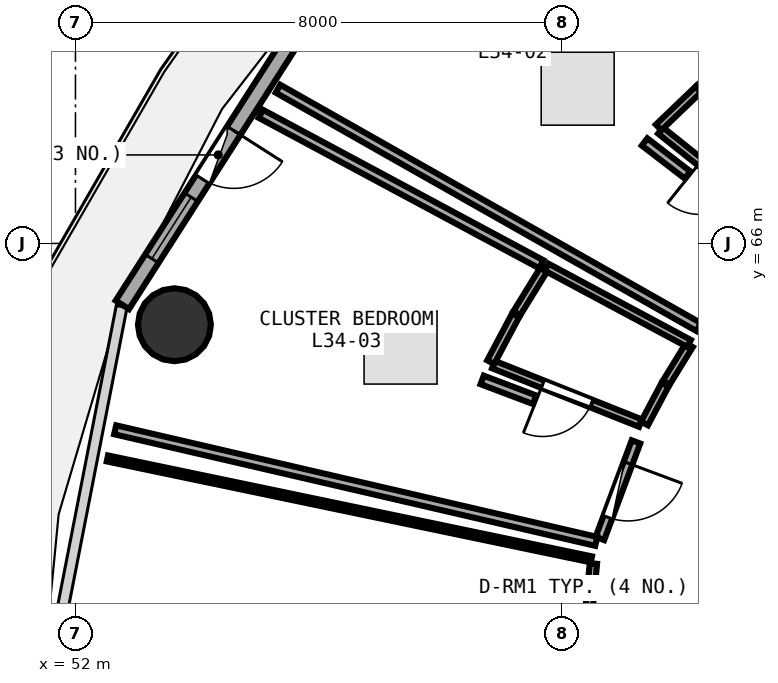
"""IFC4 building model, lengths in metres.
Left out: names, types, materials, properties, quantities, classifications, styles, units other than length and angle.
Written with IfcOpenShell. Run it as: python <this file> out.ifc"""

import sys

from ifc_helpers import new_model, si_unit, direction, frame, frame_2d, origin, origin_2d, place, context, subcontext, project, spatial, rectangle, circle, extrude, element, fill, save


model = new_model("IFC4")
c1 = context("Model", 3, precision=1e-05, world=origin(), true_north=direction((0.0, 1.0)))
c2 = subcontext(c1, "Body", "Model", "MODEL_VIEW")
j1 = project(units=[si_unit("LENGTHUNIT", "METRE"), si_unit("PLANEANGLEUNIT", "RADIAN")], contexts=[c1])
p1 = place(None, origin())
s1 = spatial("IfcSite", under=j1, at=p1, CompositionType="ELEMENT")
p2 = place(p1, origin())
s2 = spatial("IfcBuilding", under=s1, at=p2, CompositionType="ELEMENT")
p3 = place(p2, frame((0.0, 0.0, 135.6)))
s3 = spatial("IfcBuildingStorey", under=s2, at=p3, CompositionType="ELEMENT", Elevation=135.6)
p4 = place(p3, frame((53.627, 64.663, 0.0), z_axis=(0.0, 0.0, 1.0), x_axis=(1.0, 0.0, 0.0)))
e1 = element("IfcColumn", 1, at=p4, inside=s3, PredefinedType="COLUMN", context=c2, shape_type="SweptSolid", body=[
    extrude(circle(Radius=0.6, at=origin_2d()), origin(), (0.0, 0.0, 1.0), 3.75),
])
p5 = place(p3, frame((56.679, 71.1, 0.0), z_axis=(0.0, 0.0, 1.0), x_axis=(-0.538801521808, -0.842432739213, 0.0)))
e2 = element("IfcWall", 2, at=p5, inside=s3, PredefinedType="SOLIDWALL", context=c2, shape_type="SweptSolid", body=[
    extrude(rectangle(XDim=7.253, YDim=0.26, at=frame_2d((3.627, 0.0))), origin(), (0.0, 0.0, 1.0), 3.475),
])
p6 = place(p5, frame((3.852, 0.0, 0.0)))
e3 = element("IfcOpeningElement", 3, at=p6, cuts=e2, PredefinedType="OPENING", context=c2, shape_type="SweptSolid", body=[
    extrude(rectangle(XDim=0.95, YDim=2.1, at=frame_2d((0.475, 1.05))), frame((0.0, 0.14, 0.0), z_axis=(0.0, -1.0, 0.0), x_axis=(1.0, 0.0, 0.0)), (0.0, 0.0, 1.0), 0.28),
])
p7 = place(p5, frame((5.152, 0.0, 0.85)))
e4 = element("IfcOpeningElement", 4, at=p7, cuts=e2, PredefinedType="OPENING", context=c2, shape_type="SweptSolid", body=[
    extrude(rectangle(XDim=1.2, YDim=1.45, at=frame_2d((0.6, 0.725))), frame((0.0, 0.14, 0.0), z_axis=(0.0, -1.0, 0.0), x_axis=(1.0, 0.0, 0.0)), (0.0, 0.0, 1.0), 0.28),
])
p8 = place(p3, frame((63.599, 66.278, 0.0), z_axis=(0.0, 0.0, 1.0), x_axis=(-0.781386491078, 0.624047395284, 0.0)))
e5 = element("IfcWall", 5, at=p8, inside=s3, PredefinedType="PLUMBINGWALL", context=c2, shape_type="SweptSolid", body=[
    extrude(rectangle(XDim=2.529, YDim=0.13, at=frame_2d((1.265, 0.0))), origin(), (0.0, 0.0, 1.0), 2.975),
])
p9 = place(p8, frame((0.835, 0.0, 0.0)))
e6 = element("IfcOpeningElement", 6, at=p9, cuts=e5, PredefinedType="OPENING", context=c2, shape_type="SweptSolid", body=[
    extrude(rectangle(XDim=0.86, YDim=2.05, at=frame_2d((0.43, 1.025))), frame((0.0, 0.075, 0.0), z_axis=(0.0, -1.0, 0.0), x_axis=(1.0, 0.0, 0.0)), (0.0, 0.0, 1.0), 0.15),
])
p10 = place(p3, frame((61.293, 63.044, 0.0), z_axis=(0.0, 0.0, 1.0), x_axis=(-0.929051463741, 0.369950507123, 0.0)))
e7 = element("IfcWall", 7, at=p10, inside=s3, PredefinedType="PLUMBINGWALL", context=c2, shape_type="SweptSolid", body=[
    extrude(rectangle(XDim=2.602, YDim=0.13, at=frame_2d((1.301, 0.0))), origin(), (0.0, 0.0, 1.0), 3.235),
])
p11 = place(p10, frame((0.871, 0.0, 0.0)))
e8 = element("IfcOpeningElement", 8, at=p11, cuts=e7, PredefinedType="OPENING", context=c2, shape_type="SweptSolid", body=[
    extrude(rectangle(XDim=0.86, YDim=2.05, at=frame_2d((0.43, 1.025))), frame((0.0, 0.075, 0.0), z_axis=(0.0, -1.0, 0.0), x_axis=(1.0, 0.0, 0.0)), (0.0, 0.0, 1.0), 0.15),
])
p12 = place(p3, frame((61.218, 62.736, 0.0), z_axis=(0.0, 0.0, 1.0), x_axis=(-0.349718783302, -0.93685472332, 0.0)))
e9 = element("IfcWall", 9, at=p12, inside=s3, PredefinedType="PARTITIONING", context=c2, shape_type="SweptSolid", body=[
    extrude(rectangle(XDim=1.696, YDim=0.15, at=frame_2d((0.848, 0.0))), origin(), (0.0, 0.0, 1.0), 3.235),
])
p13 = place(p12, frame((0.373, 0.0, 0.0)))
e10 = element("IfcOpeningElement", 10, at=p13, cuts=e9, PredefinedType="OPENING", context=c2, shape_type="SweptSolid", body=[
    extrude(rectangle(XDim=0.95, YDim=2.08, at=frame_2d((0.475, 1.04))), frame((0.0, 0.085, 0.0), z_axis=(0.0, -1.0, 0.0), x_axis=(1.0, 0.0, 0.0)), (0.0, 0.0, 1.0), 0.17),
])
p14 = place(p3, frame((60.518, 60.736, 0.0), z_axis=(0.0, 0.0, 1.0), x_axis=(-0.093855600535, -0.995585820634, 0.0)))
e11 = element("IfcWall", 11, at=p14, inside=s3, PredefinedType="PARTITIONING", context=c2, shape_type="SweptSolid", body=[
    extrude(rectangle(XDim=3.408, YDim=0.12, at=frame_2d((1.704, 0.0))), origin(), (0.0, 0.0, 1.0), 2.975),
])
p15 = place(p14, frame((1.254, 0.0, 0.0)))
e12 = element("IfcOpeningElement", 12, at=p15, cuts=e11, PredefinedType="OPENING", context=c2, shape_type="SweptSolid", body=[
    extrude(rectangle(XDim=0.9, YDim=2.08, at=frame_2d((0.45, 1.04))), frame((0.0, 0.07, 0.0), z_axis=(0.0, -1.0, 0.0), x_axis=(1.0, 0.0, 0.0)), (0.0, 0.0, 1.0), 0.14),
])
p16 = place(p3, frame((65.046, 67.523, 0.0), z_axis=(0.0, 0.0, 1.0), x_axis=(-0.683295427563, 0.730142012674, 0.0)))
e13 = element("IfcWall", 13, at=p16, inside=s3, PredefinedType="PARTITIONING", context=c2, shape_type="SweptSolid", body=[
    extrude(rectangle(XDim=7.713, YDim=0.15, at=frame_2d((3.856, 0.0))), origin(), (0.0, 0.0, 1.0), 3.025),
])
p17 = place(p3, frame((61.591, 67.908, 0.0), z_axis=(0.0, 0.0, 1.0), x_axis=(0.722606643047, 0.691259458831, 0.0)))
e14 = element("IfcWall", 14, at=p17, inside=s3, PredefinedType="PLUMBINGWALL", context=c2, shape_type="SweptSolid", body=[
    extrude(rectangle(XDim=0.903, YDim=0.13, at=frame_2d((0.452, 0.0))), origin(), (0.0, 0.0, 1.0), 2.975),
])
p18 = place(p3, frame((62.273, 68.559, 0.0), z_axis=(0.0, 0.0, 1.0), x_axis=(0.763243602663, 0.646110828724, 0.0)))
e15 = element("IfcWall", 15, at=p18, inside=s3, PredefinedType="PLUMBINGWALL", context=c2, shape_type="SweptSolid", body=[
    extrude(rectangle(XDim=0.909, YDim=0.13, at=frame_2d((0.454, 0.0))), origin(), (0.0, 0.0, 1.0), 3.48),
])
p19 = place(p3, frame((62.249, 64.625, 0.0), z_axis=(0.0, 0.0, 1.0), x_axis=(-0.870077493263, 0.492914957896, 0.0)))
e16 = element("IfcWall", 16, at=p19, inside=s3, PredefinedType="PARTITIONING", context=c2, shape_type="SweptSolid", body=[
    extrude(rectangle(XDim=7.952, YDim=0.15, at=frame_2d((3.976, 0.0))), origin(), (0.0, 0.0, 1.0), 2.975),
])
p20 = place(p3, frame((61.36, 67.669, 0.0), z_axis=(0.0, 0.0, 1.0), x_axis=(0.793020417561, -0.609195056884, 0.0)))
e17 = element("IfcWall", 17, at=p20, inside=s3, PredefinedType="PARTITIONING", context=c2, shape_type="SweptSolid", body=[
    extrude(rectangle(XDim=0.893, YDim=0.15, at=frame_2d((0.446, 0.0))), origin(), (0.0, 0.0, 1.0), 3.48),
])
p21 = place(p3, frame((62.097, 64.329, 0.0), z_axis=(0.0, 0.0, 1.0), x_axis=(-0.524547607878, -0.851381117402, 0.0)))
e18 = element("IfcWall", 18, at=p21, inside=s3, PredefinedType="PLUMBINGWALL", context=c2, shape_type="SweptSolid", body=[
    extrude(rectangle(XDim=0.726, YDim=0.13, at=frame_2d((0.363, 0.0))), origin(), (0.0, 0.0, 1.0), 3.48),
])
p22 = place(p3, frame((61.697, 63.676, 0.0), z_axis=(0.0, 0.0, 1.0), x_axis=(-0.469163481751, -0.88311133352, 0.0)))
e19 = element("IfcWall", 19, at=p22, inside=s3, PredefinedType="PLUMBINGWALL", context=c2, shape_type="SweptSolid", body=[
    extrude(rectangle(XDim=0.721, YDim=0.13, at=frame_2d((0.36, 0.0))), origin(), (0.0, 0.0, 1.0), 3.48),
])
p23 = place(p3, frame((58.829, 64.047, 0.0), z_axis=(0.0, 0.0, 1.0), x_axis=(0.469311809042, 0.883032516895, 0.0)))
e20 = element("IfcWall", 20, at=p23, inside=s3, PredefinedType="PLUMBINGWALL", context=c2, shape_type="SweptSolid", body=[
    extrude(rectangle(XDim=0.874, YDim=0.13, at=frame_2d((0.437, 0.0))), origin(), (0.0, 0.0, 1.0), 2.975),
])
p24 = place(p3, frame((59.26, 64.853, 0.0), z_axis=(0.0, 0.0, 1.0), x_axis=(0.524097425664, 0.851658316705, 0.0)))
e21 = element("IfcWall", 21, at=p24, inside=s3, PredefinedType="PLUMBINGWALL", context=c2, shape_type="SweptSolid", body=[
    extrude(rectangle(XDim=0.879, YDim=0.13, at=frame_2d((0.44, 0.0))), origin(), (0.0, 0.0, 1.0), 2.975),
])
p25 = place(p3, frame((59.749, 65.61, 0.0), z_axis=(0.0, 0.0, 1.0), x_axis=(0.881540078275, -0.472109193296, 0.0)))
e22 = element("IfcWall", 22, at=p25, inside=s3, PredefinedType="PLUMBINGWALL", context=c2, shape_type="SweptSolid", body=[
    extrude(rectangle(XDim=2.656, YDim=0.13, at=frame_2d((1.328, 0.0))), origin(), (0.0, 0.0, 1.0), 2.975),
])
p26 = place(p3, frame((60.565, 61.1, 0.0), z_axis=(0.0, 0.0, 1.0), x_axis=(-0.97414388338, 0.225928516292, 0.0)))
e23 = element("IfcWall", 23, at=p26, inside=s3, PredefinedType="PARTITIONING", context=c2, shape_type="SweptSolid", body=[
    extrude(rectangle(XDim=8.122, YDim=0.15, at=frame_2d((4.061, 0.0))), origin(), (0.0, 0.0, 1.0), 3.025),
])
p27 = place(p3, frame((55.049, 68.131, 0.0), z_axis=(0.0, 0.0, 1.0), x_axis=(0.881257916537, -0.472635678447, 0.0)))
e24 = element("IfcWall", 24, at=p27, inside=s3, PredefinedType="PARTITIONING", context=c2, shape_type="SweptSolid", body=[
    extrude(rectangle(XDim=5.233, YDim=0.15, at=frame_2d((2.616, 0.0))), origin(), (0.0, 0.0, 1.0), 3.025),
])
p28 = place(p3, frame((58.688, 63.755, 0.0), z_axis=(0.0, 0.0, 1.0), x_axis=(0.935532386314, -0.353240929336, 0.0)))
e25 = element("IfcWall", 25, at=p28, inside=s3, PredefinedType="PARTITIONING", context=c2, shape_type="SweptSolid", body=[
    extrude(rectangle(XDim=0.922, YDim=0.15, at=frame_2d((0.461, 0.0))), origin(), (0.0, 0.0, 1.0), 3.48),
])
p29 = place(p3, frame((52.525, 62.464, 0.0), z_axis=(0.0, 0.0, 1.0), x_axis=(0.978946183013, -0.204118521367, 0.0)))
e26 = element("IfcWall", 26, at=p29, inside=s3, PredefinedType="PARTITIONING", context=c2, shape_type="SweptSolid", body=[
    extrude(rectangle(XDim=8.131, YDim=0.1, at=frame_2d((4.065, 0.0))), origin(), (0.0, 0.0, 1.0), 3.025),
])
p30 = place(p6, frame((0.95, 0.0, 0.0), z_axis=(0.0, 0.0, 1.0), x_axis=(-1.0, 0.0, 0.0)))
e27 = element("IfcDoor", 27, at=p30, inside=s3, OperationType="SINGLE_SWING_RIGHT", PredefinedType="DOOR", context=c2, shape_type="SweptSolid", body=[
    extrude(rectangle(XDim=0.95, YDim=2.1, at=frame_2d((0.475, 1.05))), frame((0.0, 0.025, 0.0), z_axis=(0.0, -1.0, 0.0), x_axis=(1.0, 0.0, 0.0)), (0.0, 0.0, 1.0), 0.05),
])
fill(e3, e27)
p31 = place(p7, origin())
e28 = element("IfcWindow", 28, at=p31, inside=s3, PartitioningType="SINGLE_PANEL", PredefinedType="WINDOW", context=c2, shape_type="SweptSolid", body=[
    extrude(rectangle(XDim=1.2, YDim=1.45, at=frame_2d((0.6, 0.725))), frame((0.0, 0.03, 0.0), z_axis=(0.0, -1.0, 0.0), x_axis=(1.0, 0.0, 0.0)), (0.0, 0.0, 1.0), 0.06),
])
fill(e4, e28)
p32 = place(p11, origin())
e29 = element("IfcDoor", 29, at=p32, inside=s3, OperationType="SINGLE_SWING_RIGHT", PredefinedType="DOOR", context=c2, shape_type="SweptSolid", body=[
    extrude(rectangle(XDim=0.86, YDim=2.05, at=frame_2d((0.43, 1.025))), frame((0.0, 0.025, 0.0), z_axis=(0.0, -1.0, 0.0), x_axis=(1.0, 0.0, 0.0)), (0.0, 0.0, 1.0), 0.05),
])
fill(e8, e29)
p33 = place(p13, origin())
e30 = element("IfcDoor", 30, at=p33, inside=s3, OperationType="SINGLE_SWING_LEFT", PredefinedType="DOOR", context=c2, shape_type="SweptSolid", body=[
    extrude(rectangle(XDim=0.95, YDim=2.08, at=frame_2d((0.475, 1.04))), frame((0.0, 0.025, 0.0), z_axis=(0.0, -1.0, 0.0), x_axis=(1.0, 0.0, 0.0)), (0.0, 0.0, 1.0), 0.05),
])
fill(e10, e30)
save(model, sys.argv[1])
